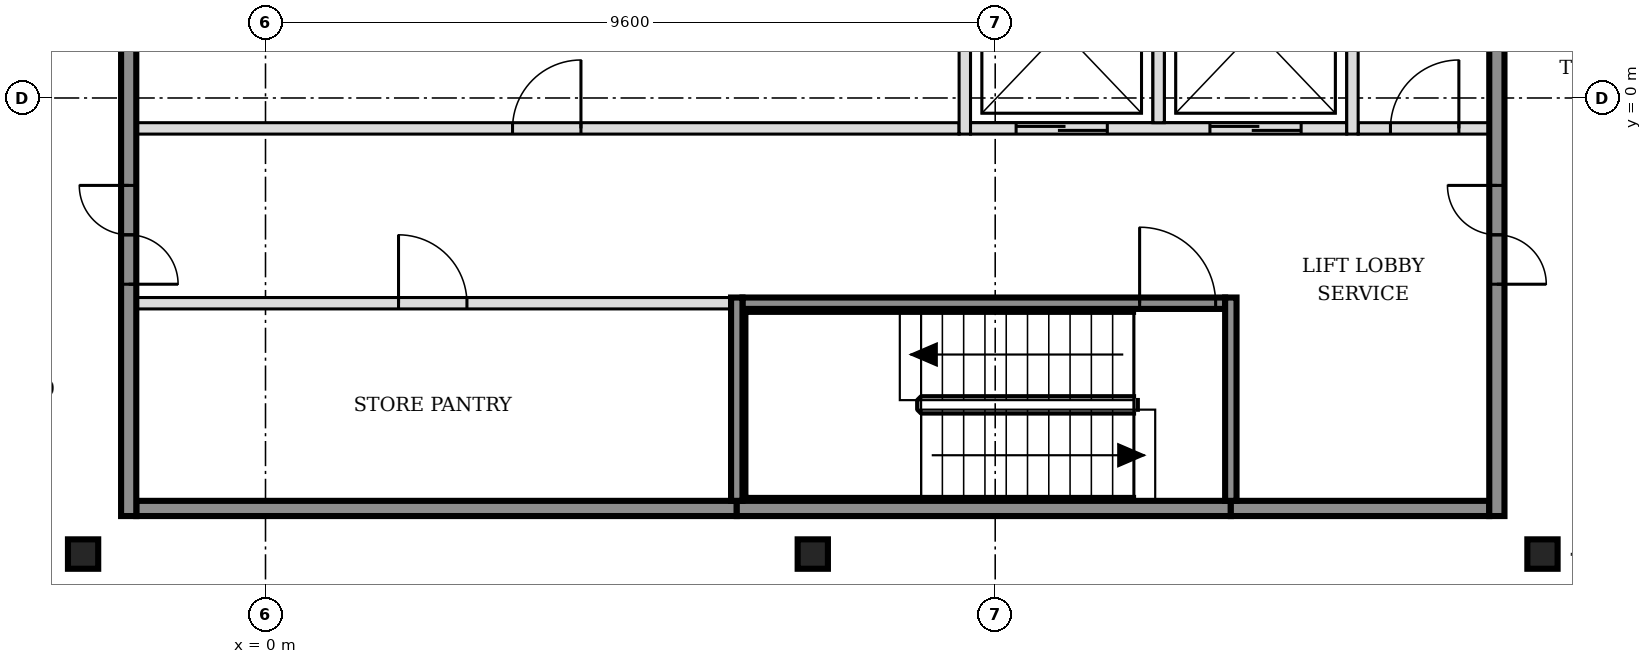
"""IFC4 building model, lengths in metres.
Left out: names, types, materials, properties, quantities, classifications, styles, units other than length and angle.
Written with IfcOpenShell. Run it as: python <this file> out.ifc"""

import sys

from ifc_helpers import new_model, si_unit, direction, frame, frame_2d, origin, origin_2d, place, context, subcontext, project, spatial, rectangle, i_section, extrude, element, fill, save


model = new_model("IFC4")
c1 = context("Model", 3, precision=1e-05, world=origin(), true_north=direction((0.0, 1.0)))
c2 = subcontext(c1, "Body", "Model", "MODEL_VIEW")
j1 = project(units=[si_unit("LENGTHUNIT", "METRE"), si_unit("PLANEANGLEUNIT", "RADIAN")], contexts=[c1])
p1 = place(None, origin())
s1 = spatial("IfcSite", under=j1, at=p1, CompositionType="ELEMENT")
p2 = place(p1, origin())
s2 = spatial("IfcBuilding", under=s1, at=p2, CompositionType="ELEMENT")
p3 = place(p2, frame((0.0, 0.0, 267.0)))
s3 = spatial("IfcBuildingStorey", under=s2, at=p3, CompositionType="ELEMENT", Elevation=267.0)
for number, where, z_axis, x_axis in (
    (1, (-2.4, -6.0, -0.15), (0.0, 0.0, 1.0), (1.0, 0.0, 0.0)),
    (2, (7.2, -6.0, -0.15), (0.0, 0.0, 1.0), (1.0, 0.0, 0.0)),
    (3, (16.8, -6.0, -0.15), (0.0, 0.0, 1.0), (1.0, 0.0, 0.0)),
):
    element("IfcColumn", number, at=place(p3, frame(where, z_axis=z_axis, x_axis=x_axis)), inside=s3, PredefinedType="COLUMN", context=c2, shape_type="SweptSolid", body=[
        extrude(i_section(OverallWidth=0.398, OverallDepth=0.387, WebThickness=0.021, FlangeThickness=0.033, FilletRadius=0.015, at=origin_2d()), origin(), (0.0, 0.0, 1.0), 3.6),
    ])
p4 = place(p3, frame((-1.7, -5.4, 0.0), z_axis=(0.0, 0.0, 1.0), x_axis=(1.0, 0.0, 0.0)))
e4 = element("IfcWall", 4, at=p4, inside=s3, PredefinedType="SOLIDWALL", context=c2, shape_type="SweptSolid", body=[
    extrude(rectangle(XDim=7.9, YDim=0.2, at=frame_2d((3.95, 0.0))), origin(), (0.0, 0.0, 1.0), 3.45),
])
p5 = place(p3, frame((6.2, -5.4, 0.0), z_axis=(0.0, 0.0, 1.0), x_axis=(1.0, 0.0, 0.0)))
e5 = element("IfcWall", 5, at=p5, inside=s3, PredefinedType="SOLIDWALL", context=c2, shape_type="SweptSolid", body=[
    extrude(rectangle(XDim=6.5, YDim=0.2, at=frame_2d((3.25, 0.0))), origin(), (0.0, 0.0, 1.0), 3.45),
])
p6 = place(p3, frame((12.7, -5.4, 0.0), z_axis=(0.0, 0.0, 1.0), x_axis=(1.0, 0.0, 0.0)))
e6 = element("IfcWall", 6, at=p6, inside=s3, PredefinedType="SOLIDWALL", context=c2, shape_type="SweptSolid", body=[
    extrude(rectangle(XDim=3.4, YDim=0.2, at=frame_2d((1.7, 0.0))), origin(), (0.0, 0.0, 1.0), 3.45),
])
p7 = place(p3, frame((-1.7, -2.7, 0.0), z_axis=(0.0, 0.0, 1.0), x_axis=(1.0, 0.0, 0.0)))
e7 = element("IfcWall", 7, at=p7, inside=s3, PredefinedType="PARTITIONING", context=c2, shape_type="SweptSolid", body=[
    extrude(rectangle(XDim=7.825, YDim=0.15, at=frame_2d((3.913, 0.0))), origin(), (0.0, 0.0, 1.0), 3.45),
])
p8 = place(p7, frame((3.45, 0.0, 0.0)))
e8 = element("IfcOpeningElement", 8, at=p8, cuts=e7, PredefinedType="OPENING", context=c2, shape_type="SweptSolid", body=[
    extrude(rectangle(XDim=0.9, YDim=2.1, at=frame_2d((0.45, 1.05))), frame((0.0, 0.085, 0.0), z_axis=(0.0, -1.0, 0.0), x_axis=(1.0, 0.0, 0.0)), (0.0, 0.0, 1.0), 0.17),
])
p9 = place(p3, frame((6.275, -2.7, 0.0), z_axis=(0.0, 0.0, 1.0), x_axis=(1.0, 0.0, 0.0)))
e9 = element("IfcWall", 9, at=p9, inside=s3, PredefinedType="SOLIDWALL", context=c2, shape_type="SweptSolid", body=[
    extrude(rectangle(XDim=6.35, YDim=0.15, at=frame_2d((3.175, 0.0))), origin(), (0.0, 0.0, 1.0), 3.45),
])
p10 = place(p9, frame((5.225, 0.0, 0.0)))
e10 = element("IfcOpeningElement", 10, at=p10, cuts=e9, PredefinedType="OPENING", context=c2, shape_type="SweptSolid", body=[
    extrude(rectangle(XDim=1.0, YDim=2.1, at=frame_2d((0.5, 1.05))), frame((0.0, 0.085, 0.0), z_axis=(0.0, -1.0, 0.0), x_axis=(1.0, 0.0, 0.0)), (0.0, 0.0, 1.0), 0.17),
])
p11 = place(p3, frame((-1.7, -0.4, 0.0), z_axis=(0.0, 0.0, 1.0), x_axis=(1.0, 0.0, 0.0)))
e11 = element("IfcWall", 11, at=p11, inside=s3, PredefinedType="PARTITIONING", context=c2, shape_type="SweptSolid", body=[
    extrude(rectangle(XDim=10.825, YDim=0.15, at=frame_2d((5.413, 0.0))), origin(), (0.0, 0.0, 1.0), 3.45),
])
p12 = place(p11, frame((4.95, 0.0, 0.0)))
e12 = element("IfcOpeningElement", 12, at=p12, cuts=e11, PredefinedType="OPENING", context=c2, shape_type="SweptSolid", body=[
    extrude(rectangle(XDim=0.9, YDim=2.1, at=frame_2d((0.45, 1.05))), frame((0.0, 0.085, 0.0), z_axis=(0.0, -1.0, 0.0), x_axis=(1.0, 0.0, 0.0)), (0.0, 0.0, 1.0), 0.17),
])
p13 = place(p3, frame((9.275, -0.4, 0.0), z_axis=(0.0, 0.0, 1.0), x_axis=(1.0, 0.0, 0.0)))
e13 = element("IfcWall", 13, at=p13, inside=s3, PredefinedType="SOLIDWALL", context=c2, shape_type="SweptSolid", body=[
    extrude(rectangle(XDim=4.95, YDim=0.15, at=frame_2d((2.475, 0.0))), origin(), (0.0, 0.0, 1.0), 3.45),
])
p14 = place(p13, frame((0.6, 0.0, 0.0)))
e14 = element("IfcOpeningElement", 14, at=p14, cuts=e13, PredefinedType="OPENING", context=c2, shape_type="SweptSolid", body=[
    extrude(rectangle(XDim=1.2, YDim=2.1, at=frame_2d((0.6, 1.05))), frame((0.0, 0.085, 0.0), z_axis=(0.0, -1.0, 0.0), x_axis=(1.0, 0.0, 0.0)), (0.0, 0.0, 1.0), 0.17),
])
p15 = place(p13, frame((3.15, 0.0, 0.0)))
e15 = element("IfcOpeningElement", 15, at=p15, cuts=e13, PredefinedType="OPENING", context=c2, shape_type="SweptSolid", body=[
    extrude(rectangle(XDim=1.2, YDim=2.1, at=frame_2d((0.6, 1.05))), frame((0.0, 0.085, 0.0), z_axis=(0.0, -1.0, 0.0), x_axis=(1.0, 0.0, 0.0)), (0.0, 0.0, 1.0), 0.17),
])
p16 = place(p3, frame((14.375, -0.4, 0.0), z_axis=(0.0, 0.0, 1.0), x_axis=(1.0, 0.0, 0.0)))
e16 = element("IfcWall", 16, at=p16, inside=s3, PredefinedType="PARTITIONING", context=c2, shape_type="SweptSolid", body=[
    extrude(rectangle(XDim=1.725, YDim=0.15, at=frame_2d((0.863, 0.0))), origin(), (0.0, 0.0, 1.0), 3.45),
])
p17 = place(p16, frame((0.425, 0.0, 0.0)))
e17 = element("IfcOpeningElement", 17, at=p17, cuts=e16, PredefinedType="OPENING", context=c2, shape_type="SweptSolid", body=[
    extrude(rectangle(XDim=0.9, YDim=2.1, at=frame_2d((0.45, 1.05))), frame((0.0, 0.085, 0.0), z_axis=(0.0, -1.0, 0.0), x_axis=(1.0, 0.0, 0.0)), (0.0, 0.0, 1.0), 0.17),
])
p18 = place(p3, frame((-1.8, -5.5, 0.0), z_axis=(0.0, 0.0, 1.0), x_axis=(0.0, 1.0, 0.0)))
e18 = element("IfcWall", 18, at=p18, inside=s3, PredefinedType="SOLIDWALL", context=c2, shape_type="SweptSolid", body=[
    extrude(rectangle(XDim=15.8, YDim=0.2, at=frame_2d((7.9, 0.0))), origin(), (0.0, 0.0, 1.0), 3.45),
])
p19 = place(p18, frame((3.05, 0.0, 0.0)))
e19 = element("IfcOpeningElement", 19, at=p19, cuts=e18, PredefinedType="OPENING", context=c2, shape_type="SweptSolid", body=[
    extrude(rectangle(XDim=1.3, YDim=2.1, at=frame_2d((0.65, 1.05))), frame((0.0, 0.11, 0.0), z_axis=(0.0, -1.0, 0.0), x_axis=(1.0, 0.0, 0.0)), (0.0, 0.0, 1.0), 0.22),
])
p20 = place(p18, frame((11.45, 0.0, 0.0)))
e20 = element("IfcOpeningElement", 20, at=p20, cuts=e18, PredefinedType="OPENING", context=c2, shape_type="SweptSolid", body=[
    extrude(rectangle(XDim=1.3, YDim=2.1, at=frame_2d((0.65, 1.05))), frame((0.0, 0.11, 0.0), z_axis=(0.0, -1.0, 0.0), x_axis=(1.0, 0.0, 0.0)), (0.0, 0.0, 1.0), 0.22),
])
p21 = place(p3, frame((6.2, -5.3, 0.0), z_axis=(0.0, 0.0, 1.0), x_axis=(0.0, 1.0, 0.0)))
e21 = element("IfcWall", 21, at=p21, inside=s3, PredefinedType="SOLIDWALL", context=c2, shape_type="SweptSolid", body=[
    extrude(rectangle(XDim=2.675, YDim=0.15, at=frame_2d((1.337, 0.0))), origin(), (0.0, 0.0, 1.0), 3.45),
])
p22 = place(p3, frame((9.2, -0.475, 0.0), z_axis=(0.0, 0.0, 1.0), x_axis=(0.0, 1.0, 0.0)))
e22 = element("IfcWall", 22, at=p22, inside=s3, PredefinedType="SOLIDWALL", context=c2, shape_type="SweptSolid", body=[
    extrude(rectangle(XDim=2.6, YDim=0.15, at=frame_2d((1.3, 0.0))), origin(), (0.0, 0.0, 1.0), 3.45),
])
p23 = place(p3, frame((11.75, -0.325, 0.0), z_axis=(0.0, 0.0, 1.0), x_axis=(0.0, 1.0, 0.0)))
e23 = element("IfcWall", 23, at=p23, inside=s3, PredefinedType="SOLIDWALL", context=c2, shape_type="SweptSolid", body=[
    extrude(rectangle(XDim=2.45, YDim=0.15, at=frame_2d((1.225, 0.0))), origin(), (0.0, 0.0, 1.0), 3.45),
])
p24 = place(p3, frame((12.7, -5.3, 0.0), z_axis=(0.0, 0.0, 1.0), x_axis=(0.0, 1.0, 0.0)))
e24 = element("IfcWall", 24, at=p24, inside=s3, PredefinedType="SOLIDWALL", context=c2, shape_type="SweptSolid", body=[
    extrude(rectangle(XDim=2.675, YDim=0.15, at=frame_2d((1.337, 0.0))), origin(), (0.0, 0.0, 1.0), 3.45),
])
p25 = place(p3, frame((14.3, -0.475, 0.0), z_axis=(0.0, 0.0, 1.0), x_axis=(0.0, 1.0, 0.0)))
e25 = element("IfcWall", 25, at=p25, inside=s3, PredefinedType="SOLIDWALL", context=c2, shape_type="SweptSolid", body=[
    extrude(rectangle(XDim=2.75, YDim=0.15, at=frame_2d((1.375, 0.0))), origin(), (0.0, 0.0, 1.0), 3.45),
])
p26 = place(p3, frame((16.2, -5.5, 0.0), z_axis=(0.0, 0.0, 1.0), x_axis=(0.0, 1.0, 0.0)))
e26 = element("IfcWall", 26, at=p26, inside=s3, PredefinedType="SOLIDWALL", context=c2, shape_type="SweptSolid", body=[
    extrude(rectangle(XDim=15.8, YDim=0.2, at=frame_2d((7.9, 0.0))), origin(), (0.0, 0.0, 1.0), 3.45),
])
p27 = place(p26, frame((3.05, 0.0, 0.0)))
e27 = element("IfcOpeningElement", 27, at=p27, cuts=e26, PredefinedType="OPENING", context=c2, shape_type="SweptSolid", body=[
    extrude(rectangle(XDim=1.3, YDim=2.1, at=frame_2d((0.65, 1.05))), frame((0.0, 0.11, 0.0), z_axis=(0.0, -1.0, 0.0), x_axis=(1.0, 0.0, 0.0)), (0.0, 0.0, 1.0), 0.22),
])
p28 = place(p26, frame((11.45, 0.0, 0.0)))
e28 = element("IfcOpeningElement", 28, at=p28, cuts=e26, PredefinedType="OPENING", context=c2, shape_type="SweptSolid", body=[
    extrude(rectangle(XDim=1.3, YDim=2.1, at=frame_2d((0.65, 1.05))), frame((0.0, 0.11, 0.0), z_axis=(0.0, -1.0, 0.0), x_axis=(1.0, 0.0, 0.0)), (0.0, 0.0, 1.0), 0.22),
])
p29 = place(p3, frame((14.322, -16.672, 0.0), z_axis=(0.0, 0.0, 1.0), x_axis=(0.707106781187, 0.707106781187, 0.0)))
e29 = element("IfcWall", 29, at=p29, inside=s3, PredefinedType="PARTITIONING", context=c2, shape_type="SweptSolid", body=[
    extrude(rectangle(XDim=23.452, YDim=0.15, at=frame_2d((11.726, 0.0))), origin(), (0.0, 0.0, 1.0), 2.73),
])
p30 = place(p29, frame((19.357, 0.0, 0.0)))
e30 = element("IfcOpeningElement", 30, at=p30, cuts=e29, PredefinedType="OPENING", context=c2, shape_type="SweptSolid", body=[
    extrude(rectangle(XDim=1.8, YDim=2.1, at=frame_2d((0.9, 1.05))), frame((0.0, 0.085, 0.0), z_axis=(0.0, -1.0, 0.0), x_axis=(1.0, 0.0, 0.0)), (0.0, 0.0, 1.0), 0.17),
])
p31 = place(p29, frame((2.975, 0.0, 0.0)))
e31 = element("IfcOpeningElement", 31, at=p31, cuts=e29, PredefinedType="OPENING", context=c2, shape_type="SweptSolid", body=[
    extrude(rectangle(XDim=0.9, YDim=2.1, at=frame_2d((0.45, 1.05))), frame((0.0, 0.085, 0.0), z_axis=(0.0, -1.0, 0.0), x_axis=(1.0, 0.0, 0.0)), (0.0, 0.0, 1.0), 0.17),
])
p32 = place(p29, frame((12.587, 0.0, 0.0)))
e32 = element("IfcOpeningElement", 32, at=p32, cuts=e29, PredefinedType="OPENING", context=c2, shape_type="SweptSolid", body=[
    extrude(rectangle(XDim=0.9, YDim=2.1, at=frame_2d((0.45, 1.05))), frame((0.0, 0.085, 0.0), z_axis=(0.0, -1.0, 0.0), x_axis=(1.0, 0.0, 0.0)), (0.0, 0.0, 1.0), 0.17),
])
p33 = place(p14, origin())
e33 = element("IfcDoor", 33, at=p33, inside=s3, OperationType="DOUBLE_DOOR_SLIDING", PredefinedType="DOOR", context=c2, shape_type="SweptSolid", body=[
    extrude(rectangle(XDim=1.2, YDim=2.1, at=frame_2d((0.6, 1.05))), frame((0.0, 0.025, 0.0), z_axis=(0.0, -1.0, 0.0), x_axis=(1.0, 0.0, 0.0)), (0.0, 0.0, 1.0), 0.05),
])
fill(e14, e33)
p34 = place(p15, origin())
e34 = element("IfcDoor", 34, at=p34, inside=s3, OperationType="DOUBLE_DOOR_SLIDING", PredefinedType="DOOR", context=c2, shape_type="SweptSolid", body=[
    extrude(rectangle(XDim=1.2, YDim=2.1, at=frame_2d((0.6, 1.05))), frame((0.0, 0.025, 0.0), z_axis=(0.0, -1.0, 0.0), x_axis=(1.0, 0.0, 0.0)), (0.0, 0.0, 1.0), 0.05),
])
fill(e15, e34)
p35 = place(p10, origin())
e35 = element("IfcDoor", 35, at=p35, inside=s3, OperationType="SINGLE_SWING_LEFT", PredefinedType="DOOR", context=c2, shape_type="SweptSolid", body=[
    extrude(rectangle(XDim=1.0, YDim=2.1, at=frame_2d((0.5, 1.05))), frame((0.0, 0.025, 0.0), z_axis=(0.0, -1.0, 0.0), x_axis=(1.0, 0.0, 0.0)), (0.0, 0.0, 1.0), 0.05),
])
fill(e10, e35)
p36 = place(p19, origin())
e36 = element("IfcDoor", 36, at=p36, inside=s3, OperationType="DOUBLE_DOOR_SINGLE_SWING", PredefinedType="DOOR", context=c2, shape_type="SweptSolid", body=[
    extrude(rectangle(XDim=1.3, YDim=2.1, at=frame_2d((0.65, 1.05))), frame((0.0, 0.025, 0.0), z_axis=(0.0, -1.0, 0.0), x_axis=(1.0, 0.0, 0.0)), (0.0, 0.0, 1.0), 0.05),
])
fill(e19, e36)
p37 = place(p27, origin())
e37 = element("IfcDoor", 37, at=p37, inside=s3, OperationType="DOUBLE_DOOR_SINGLE_SWING", PredefinedType="DOOR", context=c2, shape_type="SweptSolid", body=[
    extrude(rectangle(XDim=1.3, YDim=2.1, at=frame_2d((0.65, 1.05))), frame((0.0, 0.025, 0.0), z_axis=(0.0, -1.0, 0.0), x_axis=(1.0, 0.0, 0.0)), (0.0, 0.0, 1.0), 0.05),
])
fill(e27, e37)
p38 = place(p17, origin())
e38 = element("IfcDoor", 38, at=p38, inside=s3, OperationType="SINGLE_SWING_RIGHT", PredefinedType="DOOR", context=c2, shape_type="SweptSolid", body=[
    extrude(rectangle(XDim=0.9, YDim=2.1, at=frame_2d((0.45, 1.05))), frame((0.0, 0.025, 0.0), z_axis=(0.0, -1.0, 0.0), x_axis=(1.0, 0.0, 0.0)), (0.0, 0.0, 1.0), 0.05),
])
fill(e17, e38)
p39 = place(p8, origin())
e39 = element("IfcDoor", 39, at=p39, inside=s3, OperationType="SINGLE_SWING_LEFT", PredefinedType="DOOR", context=c2, shape_type="SweptSolid", body=[
    extrude(rectangle(XDim=0.9, YDim=2.1, at=frame_2d((0.45, 1.05))), frame((0.0, 0.025, 0.0), z_axis=(0.0, -1.0, 0.0), x_axis=(1.0, 0.0, 0.0)), (0.0, 0.0, 1.0), 0.05),
])
fill(e8, e39)
p40 = place(p12, origin())
e40 = element("IfcDoor", 40, at=p40, inside=s3, OperationType="SINGLE_SWING_RIGHT", PredefinedType="DOOR", context=c2, shape_type="SweptSolid", body=[
    extrude(rectangle(XDim=0.9, YDim=2.1, at=frame_2d((0.45, 1.05))), frame((0.0, 0.025, 0.0), z_axis=(0.0, -1.0, 0.0), x_axis=(1.0, 0.0, 0.0)), (0.0, 0.0, 1.0), 0.05),
])
fill(e12, e40)
save(model, sys.argv[1])
